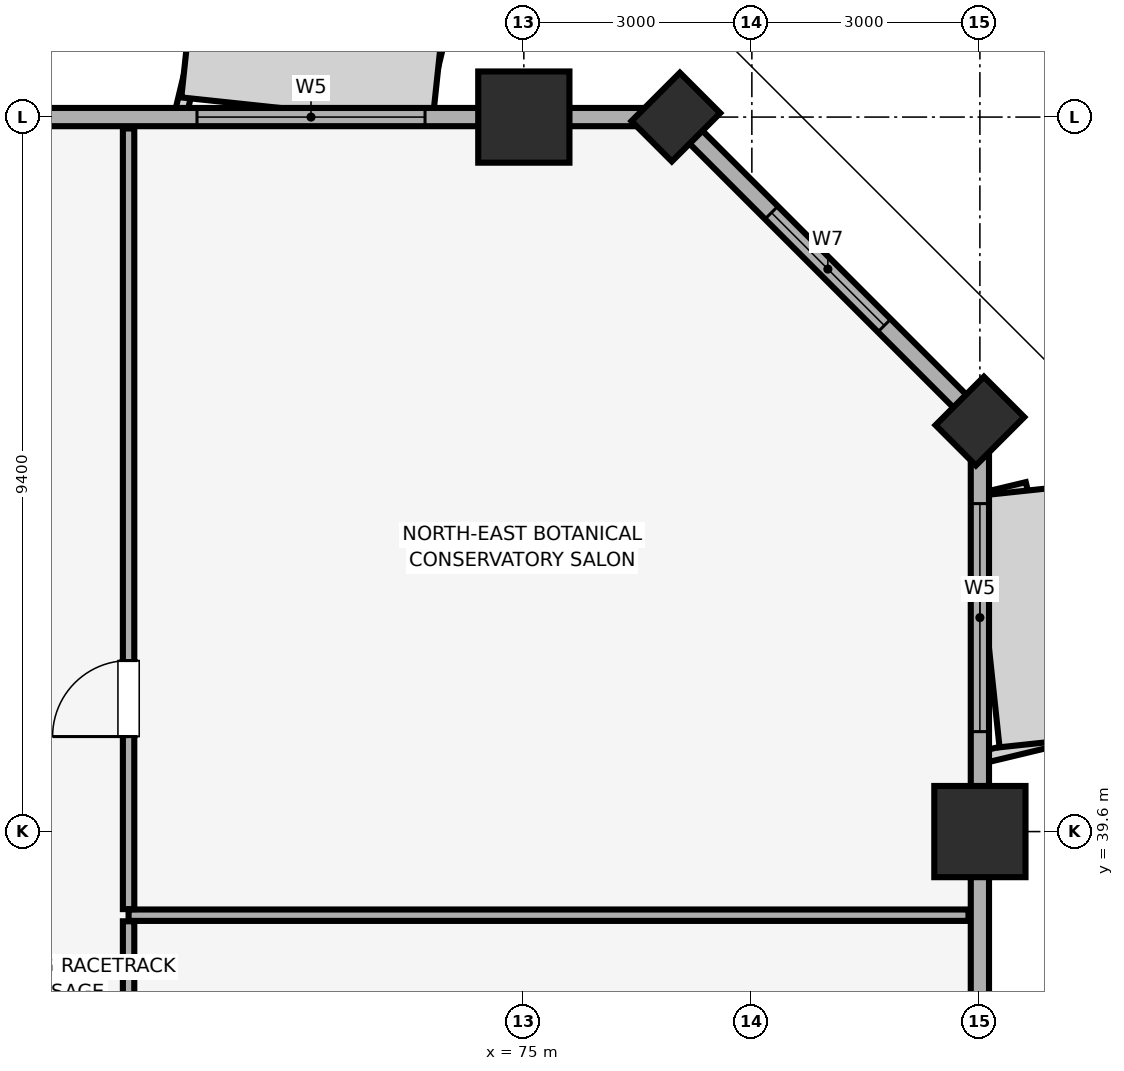
"""IFC4 building model, lengths in metres.
Left out: names, types, materials, properties, quantities, classifications, styles, units other than length and angle.
Written with IfcOpenShell. Run it as: python <this file> out.ifc"""

import sys

from ifc_helpers import new_model, si_unit, direction, frame, frame_2d, origin, origin_2d, place, context, subcontext, project, spatial, rectangle, extrude, element, fill, save


model = new_model("IFC4")
c1 = context("Model", 3, precision=1e-05, world=origin(), true_north=direction((0.0, 1.0)))
c2 = subcontext(c1, "Body", "Model", "MODEL_VIEW")
j1 = project(units=[si_unit("LENGTHUNIT", "METRE"), si_unit("PLANEANGLEUNIT", "RADIAN")], contexts=[c1])
p1 = place(None, origin())
s1 = spatial("IfcSite", under=j1, at=p1, CompositionType="ELEMENT")
p2 = place(p1, origin())
s2 = spatial("IfcBuilding", under=s1, at=p2, CompositionType="ELEMENT")
p3 = place(p2, frame((0.0, 0.0, 220.55)))
s3 = spatial("IfcBuildingStorey", under=s2, at=p3, CompositionType="ELEMENT", Elevation=220.55)
p4 = place(p3, frame((81.0, 39.6, 0.0), z_axis=(0.0, 0.0, 1.0), x_axis=(1.0, 0.0, 0.0)))
e1 = element("IfcColumn", 1, at=p4, inside=s3, PredefinedType="COLUMN", context=c2, shape_type="SweptSolid", body=[
    extrude(rectangle(XDim=1.2, YDim=1.2, at=origin_2d()), origin(), (0.0, 0.0, 1.0), 3.56),
])
for number, where, z_axis, x_axis in (
    (2, (81.0, 45.0, 0.0), (0.0, 0.0, 1.0), (0.707, 0.707, 0.0)),
    (3, (77.0, 49.0, 0.0), (0.0, 0.0, 1.0), (0.707, 0.707, 0.0)),
):
    element("IfcColumn", number, at=place(p3, frame(where, z_axis=z_axis, x_axis=x_axis)), inside=s3, PredefinedType="PILASTER", context=c2, shape_type="SweptSolid", body=[
        extrude(rectangle(XDim=0.9, YDim=0.75, at=origin_2d()), origin(), (0.0, 0.0, 1.0), 3.56),
    ])
p5 = place(p3, frame((75.0, 49.0, 0.0), z_axis=(0.0, 0.0, 1.0), x_axis=(1.0, 0.0, 0.0)))
e4 = element("IfcColumn", 4, at=p5, inside=s3, PredefinedType="COLUMN", context=c2, shape_type="SweptSolid", body=[
    extrude(rectangle(XDim=1.2, YDim=1.2, at=origin_2d()), origin(), (0.0, 0.0, 1.0), 3.56),
])
p6 = place(p3, frame((81.0, 7.0, 0.0), z_axis=(0.0, 0.0, 1.0), x_axis=(0.0, 1.0, 0.0)))
e5 = element("IfcWall", 5, at=p6, inside=s3, PredefinedType="SOLIDWALL", context=c2, shape_type="SweptSolid", body=[
    extrude(rectangle(XDim=38.0, YDim=0.24, at=frame_2d((19.0, 0.0))), origin(), (0.0, 0.0, 1.0), 2.76),
])
p7 = place(p6, frame((2.2, 0.0, 0.85)))
e6 = element("IfcOpeningElement", 6, at=p7, cuts=e5, PredefinedType="OPENING", context=c2, shape_type="SweptSolid", body=[
    extrude(rectangle(XDim=3.6, YDim=1.65, at=frame_2d((1.8, 0.825))), frame((0.0, 0.13, 0.0), z_axis=(0.0, -1.0, 0.0), x_axis=(1.0, 0.0, 0.0)), (0.0, 0.0, 1.0), 0.26),
])
p8 = place(p6, frame((9.965, 0.0, 0.85)))
e7 = element("IfcOpeningElement", 7, at=p8, cuts=e5, PredefinedType="OPENING", context=c2, shape_type="SweptSolid", body=[
    extrude(rectangle(XDim=3.6, YDim=1.65, at=frame_2d((1.8, 0.825))), frame((0.0, 0.13, 0.0), z_axis=(0.0, -1.0, 0.0), x_axis=(1.0, 0.0, 0.0)), (0.0, 0.0, 1.0), 0.26),
])
p9 = place(p6, frame((16.835, 0.0, 0.85)))
e8 = element("IfcOpeningElement", 8, at=p9, cuts=e5, PredefinedType="OPENING", context=c2, shape_type="SweptSolid", body=[
    extrude(rectangle(XDim=3.6, YDim=1.65, at=frame_2d((1.8, 0.825))), frame((0.0, 0.13, 0.0), z_axis=(0.0, -1.0, 0.0), x_axis=(1.0, 0.0, 0.0)), (0.0, 0.0, 1.0), 0.26),
])
p10 = place(p6, frame((25.35, 0.0, 0.85)))
e9 = element("IfcOpeningElement", 9, at=p10, cuts=e5, PredefinedType="OPENING", context=c2, shape_type="SweptSolid", body=[
    extrude(rectangle(XDim=3.6, YDim=1.65, at=frame_2d((1.8, 0.825))), frame((0.0, 0.13, 0.0), z_axis=(0.0, -1.0, 0.0), x_axis=(1.0, 0.0, 0.0)), (0.0, 0.0, 1.0), 0.26),
])
p11 = place(p6, frame((33.915, 0.0, 0.85)))
e10 = element("IfcOpeningElement", 10, at=p11, cuts=e5, PredefinedType="OPENING", context=c2, shape_type="SweptSolid", body=[
    extrude(rectangle(XDim=3.0, YDim=1.5, at=frame_2d((1.5, 0.75))), frame((0.0, 0.13, 0.0), z_axis=(0.0, -1.0, 0.0), x_axis=(1.0, 0.0, 0.0)), (0.0, 0.0, 1.0), 0.26),
])
p12 = place(p3, frame((81.0, 45.0, 0.0), z_axis=(0.0, 0.0, 1.0), x_axis=(-0.707106781187, 0.707106781187, 0.0)))
e11 = element("IfcWall", 11, at=p12, inside=s3, PredefinedType="SOLIDWALL", context=c2, shape_type="SweptSolid", body=[
    extrude(rectangle(XDim=5.657, YDim=0.24, at=frame_2d((2.828, 0.0))), origin(), (0.0, 0.0, 1.0), 2.76),
])
p13 = place(p12, frame((1.778, 0.0, 0.85)))
e12 = element("IfcOpeningElement", 12, at=p13, cuts=e11, PredefinedType="OPENING", context=c2, shape_type="SweptSolid", body=[
    extrude(rectangle(XDim=2.1, YDim=1.6, at=frame_2d((1.05, 0.8))), frame((0.0, 0.13, 0.0), z_axis=(0.0, -1.0, 0.0), x_axis=(1.0, 0.0, 0.0)), (0.0, 0.0, 1.0), 0.26),
])
p14 = place(p3, frame((77.0, 49.0, 0.0), z_axis=(0.0, 0.0, 1.0), x_axis=(-1.0, 0.0, 0.0)))
e13 = element("IfcWall", 13, at=p14, inside=s3, PredefinedType="SOLIDWALL", context=c2, shape_type="SweptSolid", body=[
    extrude(rectangle(XDim=70.0, YDim=0.24, at=frame_2d((35.0, 0.0))), origin(), (0.0, 0.0, 1.0), 2.76),
])
p15 = place(p14, frame((63.7, 0.0, 0.85)))
e14 = element("IfcOpeningElement", 14, at=p15, cuts=e13, PredefinedType="OPENING", context=c2, shape_type="SweptSolid", body=[
    extrude(rectangle(XDim=3.0, YDim=1.5, at=frame_2d((1.5, 0.75))), frame((0.0, 0.13, 0.0), z_axis=(0.0, -1.0, 0.0), x_axis=(1.0, 0.0, 0.0)), (0.0, 0.0, 1.0), 0.26),
])
p16 = place(p14, frame((3.3, 0.0, 0.85)))
e15 = element("IfcOpeningElement", 15, at=p16, cuts=e13, PredefinedType="OPENING", context=c2, shape_type="SweptSolid", body=[
    extrude(rectangle(XDim=3.0, YDim=1.5, at=frame_2d((1.5, 0.75))), frame((0.0, 0.13, 0.0), z_axis=(0.0, -1.0, 0.0), x_axis=(1.0, 0.0, 0.0)), (0.0, 0.0, 1.0), 0.26),
])
p17 = place(p14, frame((49.465, 0.0, 0.9)))
e16 = element("IfcOpeningElement", 16, at=p17, cuts=e13, PredefinedType="OPENING", context=c2, shape_type="SweptSolid", body=[
    extrude(rectangle(XDim=1.5, YDim=1.4, at=frame_2d((0.75, 0.7))), frame((0.0, 0.13, 0.0), z_axis=(0.0, -1.0, 0.0), x_axis=(1.0, 0.0, 0.0)), (0.0, 0.0, 1.0), 0.26),
])
p18 = place(p14, frame((41.65, 0.0, 0.9)))
e17 = element("IfcOpeningElement", 17, at=p18, cuts=e13, PredefinedType="OPENING", context=c2, shape_type="SweptSolid", body=[
    extrude(rectangle(XDim=3.6, YDim=1.5, at=frame_2d((1.8, 0.75))), frame((0.0, 0.13, 0.0), z_axis=(0.0, -1.0, 0.0), x_axis=(1.0, 0.0, 0.0)), (0.0, 0.0, 1.0), 0.26),
])
p19 = place(p14, frame((28.25, 0.0, 0.9)))
e18 = element("IfcOpeningElement", 18, at=p19, cuts=e13, PredefinedType="OPENING", context=c2, shape_type="SweptSolid", body=[
    extrude(rectangle(XDim=1.5, YDim=1.4, at=frame_2d((0.75, 0.7))), frame((0.0, 0.13, 0.0), z_axis=(0.0, -1.0, 0.0), x_axis=(1.0, 0.0, 0.0)), (0.0, 0.0, 1.0), 0.26),
])
p20 = place(p14, frame((24.6, 0.0, 0.9)))
e19 = element("IfcOpeningElement", 19, at=p20, cuts=e13, PredefinedType="OPENING", context=c2, shape_type="SweptSolid", body=[
    extrude(rectangle(XDim=2.4, YDim=1.5, at=frame_2d((1.2, 0.75))), frame((0.0, 0.13, 0.0), z_axis=(0.0, -1.0, 0.0), x_axis=(1.0, 0.0, 0.0)), (0.0, 0.0, 1.0), 0.26),
])
p21 = place(p14, frame((20.235, 0.0, 0.9)))
e20 = element("IfcOpeningElement", 20, at=p21, cuts=e13, PredefinedType="OPENING", context=c2, shape_type="SweptSolid", body=[
    extrude(rectangle(XDim=2.4, YDim=1.5, at=frame_2d((1.2, 0.75))), frame((0.0, 0.13, 0.0), z_axis=(0.0, -1.0, 0.0), x_axis=(1.0, 0.0, 0.0)), (0.0, 0.0, 1.0), 0.26),
])
p22 = place(p3, frame((69.8, 38.5, 0.0), z_axis=(0.0, 0.0, 1.0), x_axis=(1.0, 0.0, 0.0)))
e21 = element("IfcWall", 21, at=p22, inside=s3, PredefinedType="PARTITIONING", context=c2, shape_type="SweptSolid", body=[
    extrude(rectangle(XDim=11.05, YDim=0.15, at=frame_2d((5.525, 0.0))), origin(), (0.0, 0.0, 1.0), 3.56),
])
p23 = place(p3, frame((69.8, 29.495, 0.0), z_axis=(0.0, 0.0, 1.0), x_axis=(0.0, 1.0, 0.0)))
e22 = element("IfcWall", 22, at=p23, inside=s3, PredefinedType="PARTITIONING", context=c2, shape_type="SweptSolid", body=[
    extrude(rectangle(XDim=8.925, YDim=0.15, at=frame_2d((4.462, 0.0))), origin(), (0.0, 0.0, 1.0), 3.56),
])
p24 = place(p23, frame((3.955, 0.0, 0.0)))
e23 = element("IfcOpeningElement", 23, at=p24, cuts=e22, PredefinedType="OPENING", context=c2, shape_type="SweptSolid", body=[
    extrude(rectangle(XDim=1.0, YDim=2.15, at=frame_2d((0.5, 1.075))), frame((0.0, 0.085, 0.0), z_axis=(0.0, -1.0, 0.0), x_axis=(1.0, 0.0, 0.0)), (0.0, 0.0, 1.0), 0.17),
])
p25 = place(p3, frame((69.8, 38.58, 0.0), z_axis=(0.0, 0.0, 1.0), x_axis=(0.0, 1.0, 0.0)))
e24 = element("IfcWall", 24, at=p25, inside=s3, PredefinedType="PARTITIONING", context=c2, shape_type="SweptSolid", body=[
    extrude(rectangle(XDim=10.27, YDim=0.15, at=frame_2d((5.135, 0.0))), origin(), (0.0, 0.0, 1.0), 3.56),
])
p26 = place(p25, frame((2.27, 0.0, 0.0)))
e25 = element("IfcOpeningElement", 25, at=p26, cuts=e24, PredefinedType="OPENING", context=c2, shape_type="SweptSolid", body=[
    extrude(rectangle(XDim=1.0, YDim=2.15, at=frame_2d((0.5, 1.075))), frame((0.0, 0.085, 0.0), z_axis=(0.0, -1.0, 0.0), x_axis=(1.0, 0.0, 0.0)), (0.0, 0.0, 1.0), 0.17),
])
p27 = place(p13, origin())
e26 = element("IfcWindow", 26, at=p27, inside=s3, PartitioningType="SINGLE_PANEL", PredefinedType="WINDOW", context=c2, shape_type="SweptSolid", body=[
    extrude(rectangle(XDim=2.1, YDim=1.6, at=frame_2d((1.05, 0.8))), frame((0.0, 0.03, 0.0), z_axis=(0.0, -1.0, 0.0), x_axis=(1.0, 0.0, 0.0)), (0.0, 0.0, 1.0), 0.06),
])
fill(e12, e26)
p28 = place(p11, origin())
e27 = element("IfcWindow", 27, at=p28, inside=s3, PartitioningType="SINGLE_PANEL", PredefinedType="WINDOW", context=c2, shape_type="SweptSolid", body=[
    extrude(rectangle(XDim=3.0, YDim=1.5, at=frame_2d((1.5, 0.75))), frame((0.0, 0.03, 0.0), z_axis=(0.0, -1.0, 0.0), x_axis=(1.0, 0.0, 0.0)), (0.0, 0.0, 1.0), 0.06),
])
fill(e10, e27)
p29 = place(p16, origin())
e28 = element("IfcWindow", 28, at=p29, inside=s3, PartitioningType="SINGLE_PANEL", PredefinedType="WINDOW", context=c2, shape_type="SweptSolid", body=[
    extrude(rectangle(XDim=3.0, YDim=1.5, at=frame_2d((1.5, 0.75))), frame((0.0, 0.03, 0.0), z_axis=(0.0, -1.0, 0.0), x_axis=(1.0, 0.0, 0.0)), (0.0, 0.0, 1.0), 0.06),
])
fill(e15, e28)
p30 = place(p26, origin())
e29 = element("IfcDoor", 29, at=p30, inside=s3, OperationType="SINGLE_SWING_LEFT", PredefinedType="DOOR", context=c2, shape_type="SweptSolid", body=[
    extrude(rectangle(XDim=1.0, YDim=2.15, at=frame_2d((0.5, 1.075))), frame((0.0, 0.025, 0.0), z_axis=(0.0, -1.0, 0.0), x_axis=(1.0, 0.0, 0.0)), (0.0, 0.0, 1.0), 0.05),
])
fill(e25, e29)
save(model, sys.argv[1])
